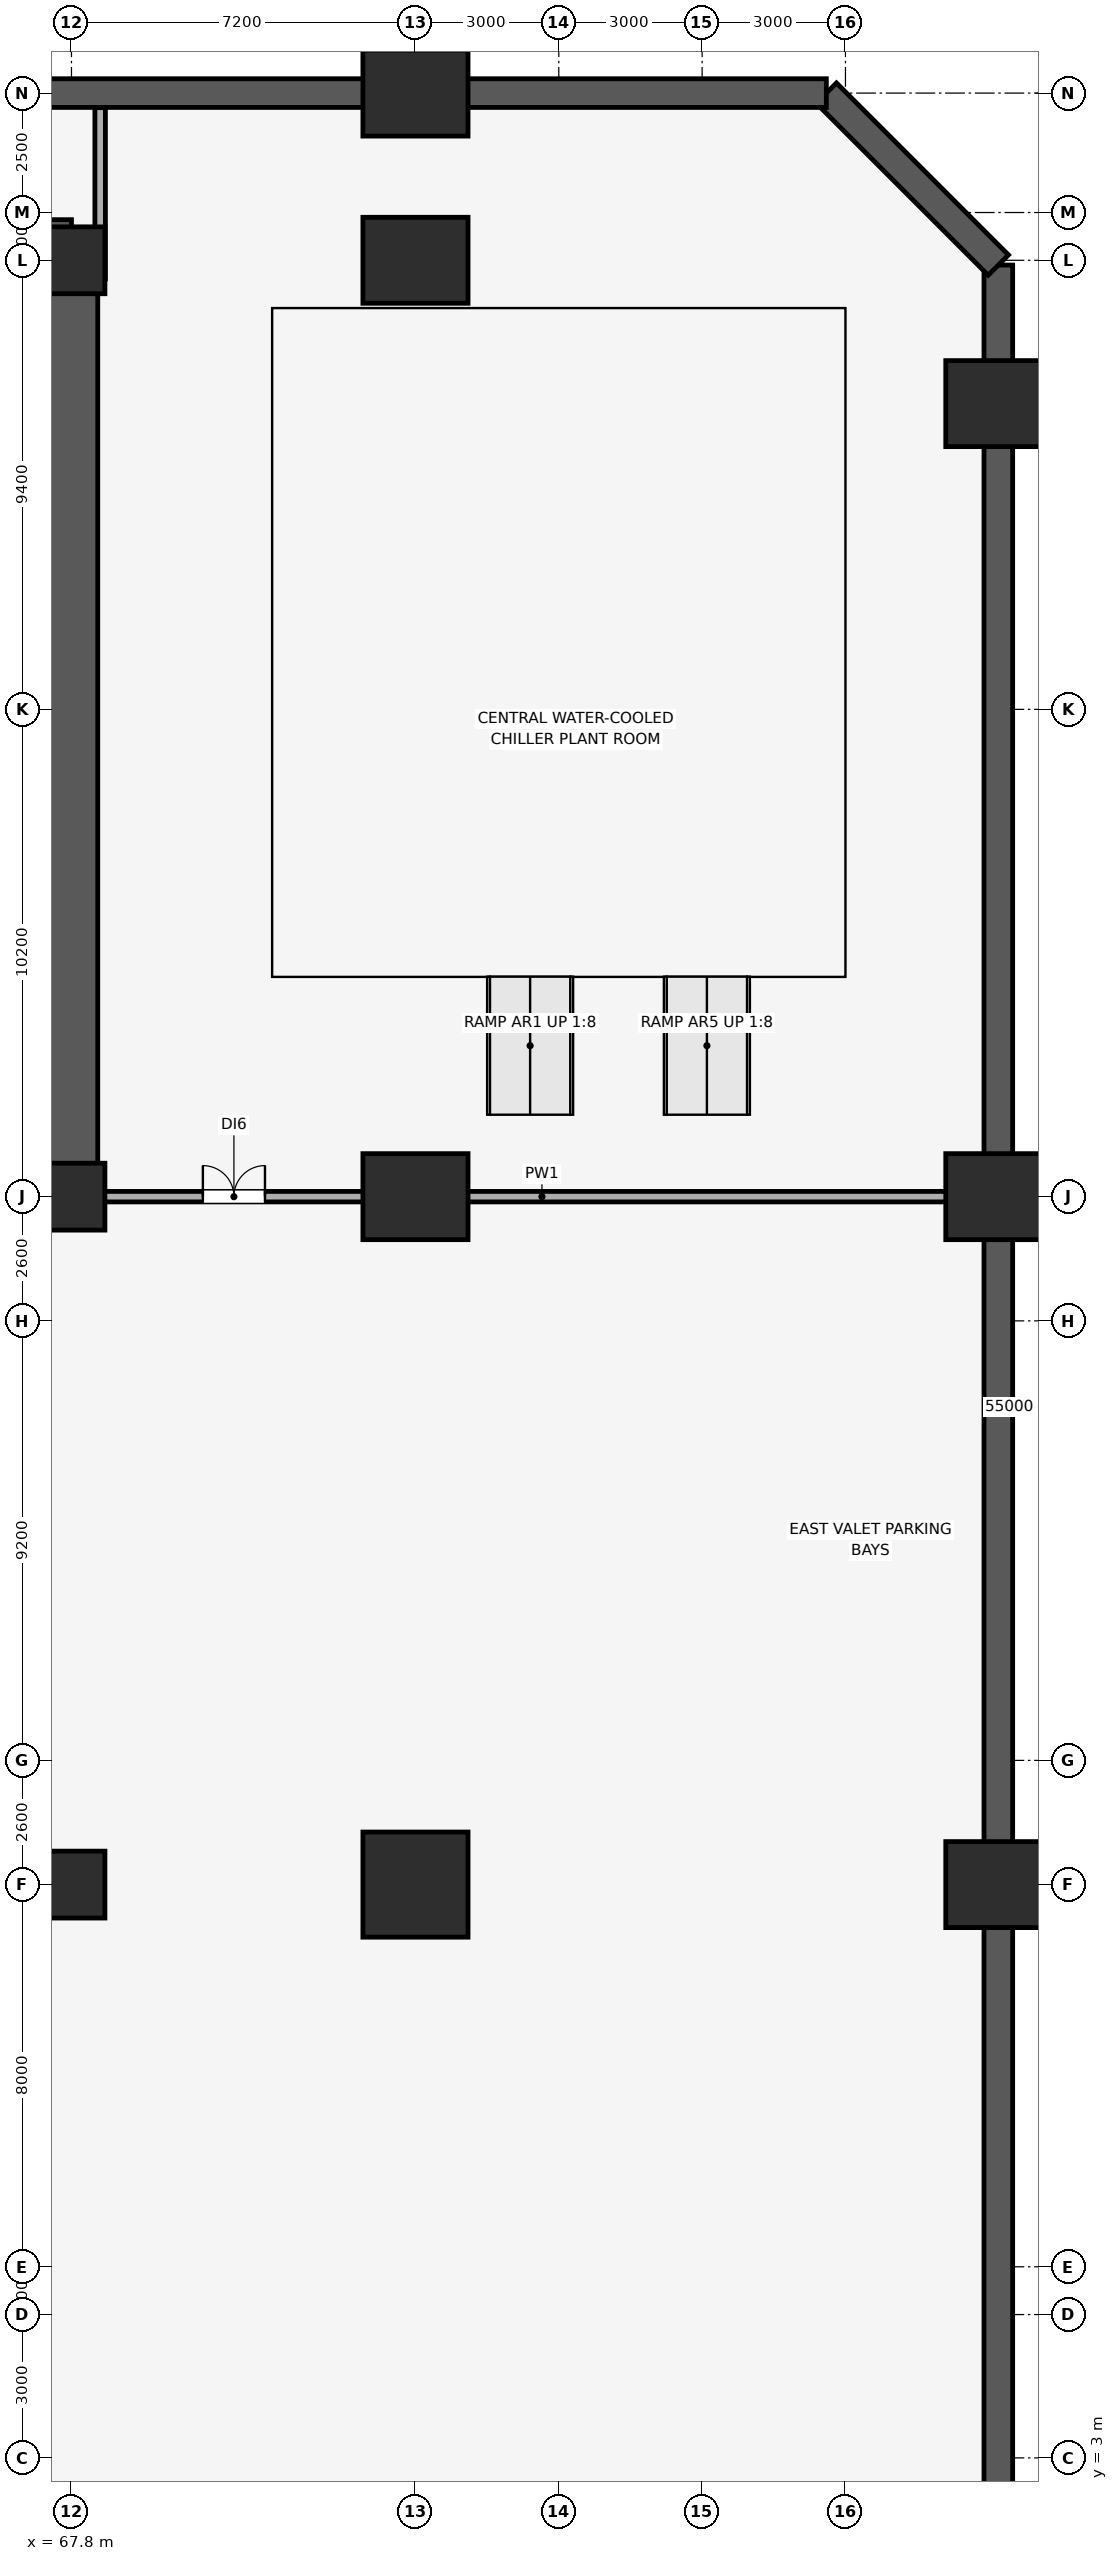
"""IFC4 building model, lengths in metres.
Left out: names, types, materials, properties, quantities, classifications, styles, units other than length and angle.
Written with IfcOpenShell. Run it as: python <this file> out.ifc"""

import sys

from ifc_helpers import new_model, si_unit, direction, frame, frame_2d, origin, origin_2d, place, context, subcontext, project, spatial, rectangle, circle, extrude, element, fill, save


model = new_model("IFC4")
c1 = context("Model", 3, precision=1e-05, world=origin(), true_north=direction((0.0, 1.0)))
c2 = subcontext(c1, "Body", "Model", "MODEL_VIEW")
j1 = project(units=[si_unit("LENGTHUNIT", "METRE"), si_unit("PLANEANGLEUNIT", "RADIAN")], contexts=[c1])
p1 = place(None, origin())
s1 = spatial("IfcSite", under=j1, at=p1, CompositionType="ELEMENT")
p2 = place(p1, origin())
s2 = spatial("IfcBuilding", under=s1, at=p2, CompositionType="ELEMENT")
p3 = place(p2, frame((0.0, 0.0, -9.2)))
s3 = spatial("IfcBuildingStorey", under=s2, at=p3, CompositionType="ELEMENT", Elevation=-9.2)
for number, where, z_axis, x_axis in (
    (1, (87.2, 15.0, 0.0), (0.0, 0.0, 1.0), (1.0, 0.0, 0.0)),
    (2, (87.2, 29.4, 0.0), (0.0, 0.0, 1.0), (1.0, 0.0, 0.0)),
    (3, (87.2, 46.0, 0.0), (0.0, 0.0, 1.0), (1.0, 0.0, 0.0)),
):
    element("IfcColumn", number, at=place(p3, frame(where, z_axis=z_axis, x_axis=x_axis)), inside=s3, PredefinedType="USERDEFINED", context=c2, shape_type="SweptSolid", body=[
        extrude(rectangle(XDim=2.2, YDim=1.8, at=origin_2d()), origin(), (0.0, 0.0, 1.0), 4.3),
    ])
p4 = place(p3, frame((75.0, 15.0, 0.0), z_axis=(0.0, 0.0, 1.0), x_axis=(1.0, 0.0, 0.0)))
e4 = element("IfcColumn", 4, at=p4, inside=s3, PredefinedType="USERDEFINED", context=c2, shape_type="SweptSolid", body=[
    extrude(circle(Radius=1.1, at=origin_2d()), origin(), (0.0, 0.0, 1.0), 4.3),
])
p5 = place(p3, frame((67.8, 15.0, 0.0), z_axis=(0.0, 0.0, 1.0), x_axis=(1.0, 0.0, 0.0)))
e5 = element("IfcColumn", 5, at=p5, inside=s3, PredefinedType="COLUMN", context=c2, shape_type="SweptSolid", body=[
    extrude(rectangle(XDim=1.4, YDim=1.4, at=origin_2d()), origin(), (0.0, 0.0, 1.0), 4.3),
])
for number, where, z_axis, x_axis in (
    (6, (75.0, 29.4, 0.0), (0.0, 0.0, 1.0), (1.0, 0.0, 0.0)),
    (7, (75.0, 49.0, 0.0), (0.0, 0.0, 1.0), (1.0, 0.0, 0.0)),
    (8, (75.0, 52.5, 0.0), (0.0, 0.0, 1.0), (1.0, 0.0, 0.0)),
):
    element("IfcColumn", number, at=place(p3, frame(where, z_axis=z_axis, x_axis=x_axis)), inside=s3, PredefinedType="USERDEFINED", context=c2, shape_type="SweptSolid", body=[
        extrude(rectangle(XDim=2.2, YDim=1.8, at=origin_2d()), origin(), (0.0, 0.0, 1.0), 4.3),
    ])
for number, where, z_axis, x_axis in (
    (9, (67.8, 29.4, 0.0), (0.0, 0.0, 1.0), (1.0, 0.0, 0.0)),
    (10, (67.8, 49.0, 0.0), (0.0, 0.0, 1.0), (1.0, 0.0, 0.0)),
):
    element("IfcColumn", number, at=place(p3, frame(where, z_axis=z_axis, x_axis=x_axis)), inside=s3, PredefinedType="COLUMN", context=c2, shape_type="SweptSolid", body=[
        extrude(rectangle(XDim=1.4, YDim=1.4, at=origin_2d()), origin(), (0.0, 0.0, 1.0), 4.3),
    ])
p6 = place(p3, frame((87.2, 1.1, 0.0), z_axis=(0.0, 0.0, 1.0), x_axis=(0.0, 1.0, 0.0)))
e11 = element("IfcWall", 11, at=p6, inside=s3, PredefinedType="USERDEFINED", context=c2, shape_type="SweptSolid", body=[
    extrude(rectangle(XDim=47.8, YDim=0.6, at=frame_2d((23.9, 0.0))), origin(), (0.0, 0.0, 1.0), 4.3),
])
p7 = place(p3, frame((87.2, 48.9, 0.0), z_axis=(0.0, 0.0, 1.0), x_axis=(-0.707082803744, 0.707130757816, 0.0)))
e12 = element("IfcWall", 12, at=p7, inside=s3, PredefinedType="USERDEFINED", context=c2, shape_type="SweptSolid", body=[
    extrude(rectangle(XDim=5.091, YDim=0.6, at=frame_2d((2.545, 0.0))), origin(), (0.0, 0.0, 1.0), 4.3),
])
p8 = place(p3, frame((83.6, 52.5, 0.0), z_axis=(0.0, 0.0, 1.0), x_axis=(-1.0, 0.0, 0.0)))
e13 = element("IfcWall", 13, at=p8, inside=s3, PredefinedType="USERDEFINED", context=c2, shape_type="SweptSolid", body=[
    extrude(rectangle(XDim=83.2, YDim=0.6, at=frame_2d((41.6, 0.0))), origin(), (0.0, 0.0, 1.0), 4.3),
])
p9 = place(p3, frame((16.2, 49.3, 0.0), z_axis=(0.0, 0.0, 1.0), x_axis=(1.0, 0.0, 0.0)))
e14 = element("IfcWall", 14, at=p9, inside=s3, PredefinedType="SHEAR", context=c2, shape_type="SweptSolid", body=[
    extrude(rectangle(XDim=51.6, YDim=1.1, at=frame_2d((25.8, 0.0))), origin(), (0.0, 0.0, 1.0), 4.3),
])
p10 = place(p3, frame((67.8, 29.4, 0.0), z_axis=(0.0, 0.0, 1.0), x_axis=(0.0, 1.0, 0.0)))
e15 = element("IfcWall", 15, at=p10, inside=s3, PredefinedType="SHEAR", context=c2, shape_type="SweptSolid", body=[
    extrude(rectangle(XDim=19.2, YDim=1.1, at=frame_2d((9.6, 0.0))), origin(), (0.0, 0.0, 1.0), 4.3),
])
p11 = place(p3, frame((68.4, 29.4, 0.0), z_axis=(0.0, 0.0, 1.0), x_axis=(1.0, 0.0, 0.0)))
e16 = element("IfcWall", 16, at=p11, inside=s3, PredefinedType="PARTITIONING", context=c2, shape_type="SweptSolid", body=[
    extrude(rectangle(XDim=18.495, YDim=0.22, at=frame_2d((9.248, 0.0))), origin(), (0.0, 0.0, 1.0), 3.5),
])
p12 = place(p11, frame((2.15, 0.0, 0.0)))
e17 = element("IfcOpeningElement", 17, at=p12, cuts=e16, PredefinedType="OPENING", context=c2, shape_type="SweptSolid", body=[
    extrude(rectangle(XDim=1.3, YDim=2.2, at=frame_2d((0.65, 1.1))), frame((0.0, 0.12, 0.0), z_axis=(0.0, -1.0, 0.0), x_axis=(1.0, 0.0, 0.0)), (0.0, 0.0, 1.0), 0.24),
])
p13 = place(p3, frame((68.4, 48.61, 0.0), z_axis=(0.0, 0.0, 1.0), x_axis=(0.0, 1.0, 0.0)))
e18 = element("IfcWall", 18, at=p13, inside=s3, PredefinedType="PARTITIONING", context=c2, shape_type="SweptSolid", body=[
    extrude(rectangle(XDim=3.585, YDim=0.22, at=frame_2d((1.792, 0.0))), origin(), (0.0, 0.0, 1.0), 4.3),
])
p14 = place(p12, origin())
e19 = element("IfcDoor", 19, at=p14, inside=s3, OperationType="DOUBLE_DOOR_SINGLE_SWING", PredefinedType="DOOR", context=c2, shape_type="SweptSolid", body=[
    extrude(rectangle(XDim=1.3, YDim=2.2, at=frame_2d((0.65, 1.1))), frame((0.0, 0.025, 0.0), z_axis=(0.0, -1.0, 0.0), x_axis=(1.0, 0.0, 0.0)), (0.0, 0.0, 1.0), 0.05),
])
fill(e17, e19)
save(model, sys.argv[1])
